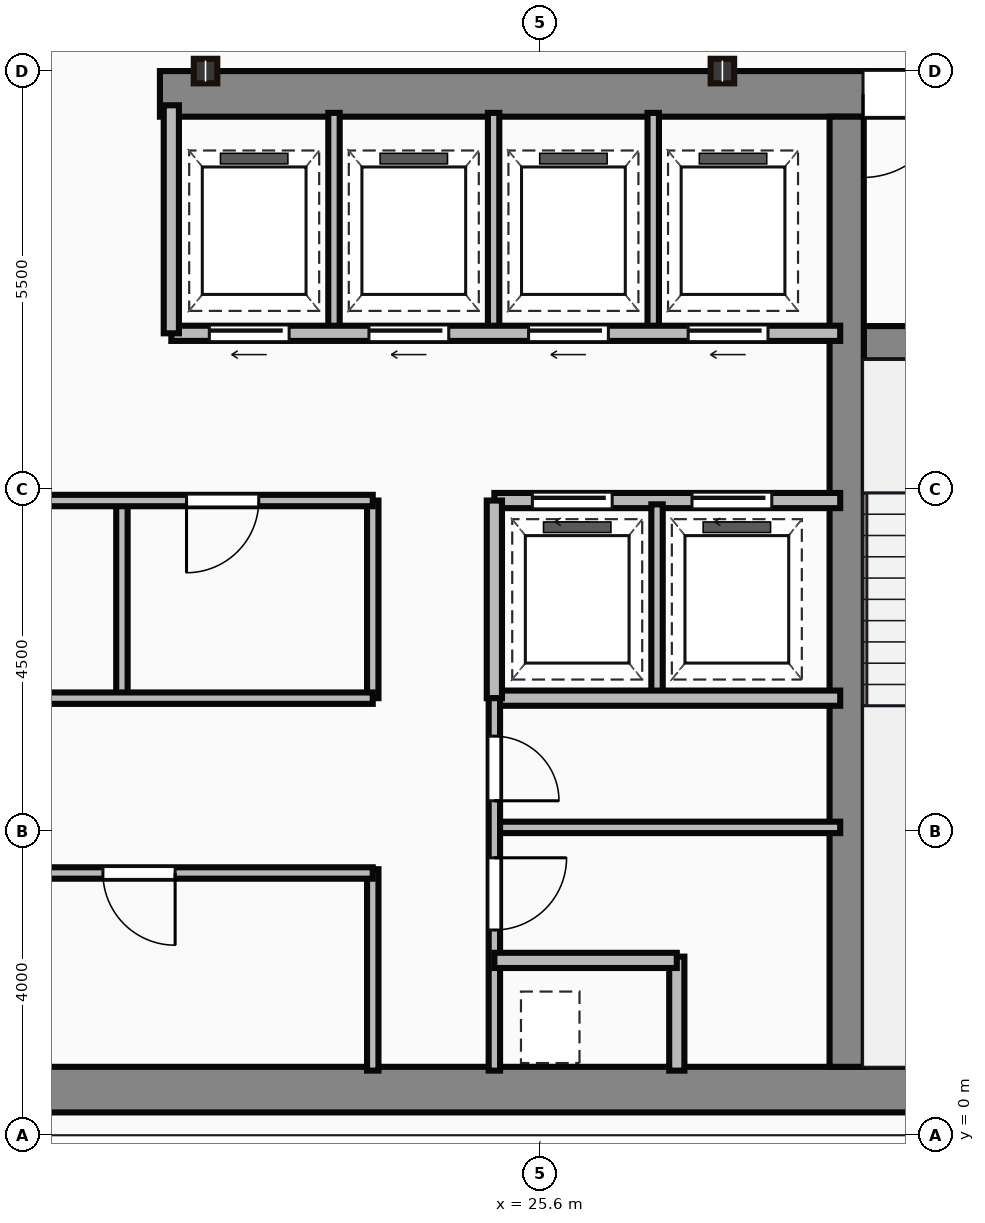
"""IFC4 building model, lengths in metres.
Left out: names, types, materials, properties, quantities, classifications, styles, units other than length and angle.
Written with IfcOpenShell. Run it as: python <this file> out.ifc"""

import sys

from ifc_helpers import new_model, si_unit, direction, frame, frame_2d, origin, origin_2d, place, context, subcontext, project, spatial, rectangle, i_section, extrude, source, transform, mapped, element, fill, save


model = new_model("IFC4")
c1 = context("Model", 3, precision=1e-05, world=origin(), true_north=direction((0.0, 1.0)))
c2 = subcontext(c1, "Body", "Model", "MODEL_VIEW")
j1 = project(units=[si_unit("LENGTHUNIT", "METRE"), si_unit("PLANEANGLEUNIT", "RADIAN")], contexts=[c1])
p1 = place(None, origin())
s1 = spatial("IfcSite", under=j1, at=p1, CompositionType="ELEMENT")
p2 = place(p1, origin())
s2 = spatial("IfcBuilding", under=s1, at=p2, CompositionType="ELEMENT")
p3 = place(p2, frame((0.0, 0.0, 225.1)))
s3 = spatial("IfcBuildingStorey", under=s2, at=p3, CompositionType="ELEMENT", Elevation=225.1)
m1 = source(origin(), c2, "Body", "SweptSolid", [
    extrude(rectangle(XDim=29.5, YDim=0.6, at=frame_2d((14.75, 0.0))), origin(), (0.0, 0.0, 1.0), 3.65),
])
p4 = place(p3, frame((4.5, 0.6, 0.0), z_axis=(0.0, 0.0, 1.0), x_axis=(1.0, 0.0, 0.0)))
e1 = element("IfcWall", 1, at=p4, inside=s3, PredefinedType="SHEAR", context=c2, shape_type="MappedRepresentation", body=[
    mapped(m1, transform((0.0, 0.0, 0.0))),
])
m2 = source(origin(), c2, "Body", "SweptSolid", [
    extrude(rectangle(XDim=12.6, YDim=0.6, at=frame_2d((6.3, 0.0))), origin(), (0.0, 0.0, 1.0), 3.65),
])
p5 = place(p3, frame((20.6, 13.7, 0.0), z_axis=(0.0, 0.0, 1.0), x_axis=(1.0, 0.0, 0.0)))
e2 = element("IfcWall", 2, at=p5, inside=s3, PredefinedType="SHEAR", context=c2, shape_type="MappedRepresentation", body=[
    mapped(m2, transform((0.0, 0.0, 0.0))),
])
p6 = place(p5, frame((9.25, 0.0, 0.0)))
e3 = element("IfcOpeningElement", 3, at=p6, cuts=e2, PredefinedType="OPENING", context=c2, shape_type="SweptSolid", body=[
    extrude(rectangle(XDim=1.1, YDim=2.15, at=frame_2d((0.55, 1.075))), frame((0.0, 0.31, 0.0), z_axis=(0.0, -1.0, 0.0), x_axis=(1.0, 0.0, 0.0)), (0.0, 0.0, 1.0), 0.62),
])
m3 = source(origin(), c2, "Body", "SweptSolid", [
    extrude(rectangle(XDim=12.5, YDim=0.45, at=frame_2d((6.25, 0.0))), origin(), (0.0, 0.0, 1.0), 3.65),
])
p7 = place(p3, frame((29.635, 0.9, 0.0), z_axis=(0.0, 0.0, 1.0), x_axis=(0.0, 1.0, 0.0)))
e4 = element("IfcWall", 4, at=p7, inside=s3, PredefinedType="SHEAR", context=c2, shape_type="MappedRepresentation", body=[
    mapped(m3, transform((0.0, 0.0, 0.0))),
])
m4 = source(origin(), c2, "Body", "SweptSolid", [
    extrude(rectangle(XDim=3.39, YDim=0.45, at=frame_2d((1.695, 0.0))), origin(), (0.0, 0.0, 1.0), 3.65),
])
p8 = place(p3, frame((29.86, 10.42, 0.0), z_axis=(0.0, 0.0, 1.0), x_axis=(1.0, 0.0, 0.0)))
e5 = element("IfcWall", 5, at=p8, inside=s3, PredefinedType="SHEAR", context=c2, shape_type="MappedRepresentation", body=[
    mapped(m4, transform((0.0, 0.0, 0.0))),
])
p9 = place(p8, frame((1.1, 0.0, 0.0)))
e6 = element("IfcOpeningElement", 6, at=p9, cuts=e5, PredefinedType="OPENING", context=c2, shape_type="SweptSolid", body=[
    extrude(rectangle(XDim=1.1, YDim=2.15, at=frame_2d((0.55, 1.075))), frame((0.0, 0.235, 0.0), z_axis=(0.0, -1.0, 0.0), x_axis=(1.0, 0.0, 0.0)), (0.0, 0.0, 1.0), 0.47),
])
m5 = source(origin(), c2, "Body", "SweptSolid", [
    extrude(i_section(OverallWidth=0.309, OverallDepth=0.323, WebThickness=0.014, FlangeThickness=0.023, at=origin_2d()), origin(), (0.0, 0.0, 1.0), 3.65),
])
for number, where, z_axis, x_axis in (
    (7, (21.2, 14.0, 0.0), (0.0, 0.0, 1.0), (1.0, 0.0, 0.0)),
    (8, (28.0, 14.0, 0.0), (0.0, 0.0, 1.0), (1.0, 0.0, 0.0)),
):
    element("IfcColumn", number, at=place(p3, frame(where, z_axis=z_axis, x_axis=x_axis)), inside=s3, PredefinedType="COLUMN", context=c2, shape_type="MappedRepresentation", body=[
        mapped(m5, transform((0.0, 0.0, 0.0))),
    ])
m6 = source(origin(), c2, "Body", "SweptSolid", [
    extrude(rectangle(XDim=10.35, YDim=0.15, at=frame_2d((5.175, 0.0))), origin(), (0.0, 0.0, 1.0), 3.4),
])
p10 = place(p3, frame((13.05, 3.45, 0.0), z_axis=(0.0, 0.0, 1.0), x_axis=(1.0, 0.0, 0.0)))
e9 = element("IfcWall", 9, at=p10, inside=s3, PredefinedType="PARTITIONING", context=c2, shape_type="MappedRepresentation", body=[
    mapped(m6, transform((0.0, 0.0, 0.0))),
])
p11 = place(p10, frame((0.25, 0.0, 0.0)))
e10 = element("IfcOpeningElement", 10, at=p11, cuts=e9, PredefinedType="OPENING", context=c2, shape_type="SweptSolid", body=[
    extrude(rectangle(XDim=0.95, YDim=2.15, at=frame_2d((0.475, 1.075))), frame((0.0, 0.085, 0.0), z_axis=(0.0, -1.0, 0.0), x_axis=(1.0, 0.0, 0.0)), (0.0, 0.0, 1.0), 0.17),
])
p12 = place(p10, frame((6.8, 0.0, 0.0)))
e11 = element("IfcOpeningElement", 11, at=p12, cuts=e9, PredefinedType="OPENING", context=c2, shape_type="SweptSolid", body=[
    extrude(rectangle(XDim=0.95, YDim=2.15, at=frame_2d((0.475, 1.075))), frame((0.0, 0.085, 0.0), z_axis=(0.0, -1.0, 0.0), x_axis=(1.0, 0.0, 0.0)), (0.0, 0.0, 1.0), 0.17),
])
m7 = source(origin(), c2, "Body", "SweptSolid", [
    extrude(rectangle(XDim=2.65, YDim=0.15, at=frame_2d((1.325, 0.0))), origin(), (0.0, 0.0, 1.0), 3.4),
])
p13 = place(p3, frame((23.4, 0.85, 0.0), z_axis=(0.0, 0.0, 1.0), x_axis=(0.0, 1.0, 0.0)))
e12 = element("IfcWall", 12, at=p13, inside=s3, PredefinedType="PARTITIONING", context=c2, shape_type="MappedRepresentation", body=[
    mapped(m7, transform((0.0, 0.0, 0.0))),
])
m8 = source(origin(), c2, "Body", "SweptSolid", [
    extrude(rectangle(XDim=11.85, YDim=0.15, at=frame_2d((5.925, 0.0))), origin(), (0.0, 0.0, 1.0), 3.4),
])
p14 = place(p3, frame((11.55, 5.75, 0.0), z_axis=(0.0, 0.0, 1.0), x_axis=(1.0, 0.0, 0.0)))
e13 = element("IfcWall", 13, at=p14, inside=s3, PredefinedType="PARTITIONING", context=c2, shape_type="MappedRepresentation", body=[
    mapped(m8, transform((0.0, 0.0, 0.0))),
])
p15 = place(p3, frame((11.55, 8.35, 0.0), z_axis=(0.0, 0.0, 1.0), x_axis=(1.0, 0.0, 0.0)))
e14 = element("IfcWall", 14, at=p15, inside=s3, PredefinedType="PARTITIONING", context=c2, shape_type="MappedRepresentation", body=[
    mapped(m8, transform((0.0, 0.0, 0.0))),
])
p16 = place(p15, frame((1.1, 0.0, 0.0)))
e15 = element("IfcOpeningElement", 15, at=p16, cuts=e14, PredefinedType="OPENING", context=c2, shape_type="SweptSolid", body=[
    extrude(rectangle(XDim=0.95, YDim=2.15, at=frame_2d((0.475, 1.075))), frame((0.0, 0.085, 0.0), z_axis=(0.0, -1.0, 0.0), x_axis=(1.0, 0.0, 0.0)), (0.0, 0.0, 1.0), 0.17),
])
p17 = place(p15, frame((9.4, 0.0, 0.0)))
e16 = element("IfcOpeningElement", 16, at=p17, cuts=e14, PredefinedType="OPENING", context=c2, shape_type="SweptSolid", body=[
    extrude(rectangle(XDim=0.95, YDim=2.15, at=frame_2d((0.475, 1.075))), frame((0.0, 0.085, 0.0), z_axis=(0.0, -1.0, 0.0), x_axis=(1.0, 0.0, 0.0)), (0.0, 0.0, 1.0), 0.17),
])
m9 = source(origin(), c2, "Body", "SweptSolid", [
    extrude(rectangle(XDim=2.6, YDim=0.15, at=frame_2d((1.3, 0.0))), origin(), (0.0, 0.0, 1.0), 3.4),
])
p18 = place(p3, frame((23.4, 5.75, 0.0), z_axis=(0.0, 0.0, 1.0), x_axis=(0.0, 1.0, 0.0)))
e17 = element("IfcWall", 17, at=p18, inside=s3, PredefinedType="PARTITIONING", context=c2, shape_type="MappedRepresentation", body=[
    mapped(m9, transform((0.0, 0.0, 0.0))),
])
m10 = source(origin(), c2, "Body", "SweptSolid", [
    extrude(rectangle(XDim=2.5, YDim=0.15, at=frame_2d((1.25, 0.0))), origin(), (0.0, 0.0, 1.0), 3.4),
])
p19 = place(p3, frame((20.1, 5.8, 0.0), z_axis=(0.0, 0.0, 1.0), x_axis=(0.0, 1.0, 0.0)))
e18 = element("IfcWall", 18, at=p19, inside=s3, PredefinedType="PARTITIONING", context=c2, shape_type="MappedRepresentation", body=[
    mapped(m10, transform((0.0, 0.0, 0.0))),
])
m11 = source(origin(), c2, "Body", "SweptSolid", [
    extrude(rectangle(XDim=8.8, YDim=0.2, at=frame_2d((4.4, 0.0))), origin(), (0.0, 0.0, 1.0), 3.4),
])
p20 = place(p3, frame((20.75, 10.55, 0.0), z_axis=(0.0, 0.0, 1.0), x_axis=(1.0, 0.0, 0.0)))
e19 = element("IfcWall", 19, at=p20, inside=s3, PredefinedType="PARTITIONING", context=c2, shape_type="MappedRepresentation", body=[
    mapped(m11, transform((0.0, 0.0, 0.0))),
])
p21 = place(p20, frame((0.5, 0.0, 0.0)))
e20 = element("IfcOpeningElement", 20, at=p21, cuts=e19, PredefinedType="OPENING", context=c2, shape_type="SweptSolid", body=[
    extrude(rectangle(XDim=1.05, YDim=2.15, at=frame_2d((0.525, 1.075))), frame((0.0, 0.11, 0.0), z_axis=(0.0, -1.0, 0.0), x_axis=(1.0, 0.0, 0.0)), (0.0, 0.0, 1.0), 0.22),
])
p22 = place(p20, frame((2.6, 0.0, 0.0)))
e21 = element("IfcOpeningElement", 21, at=p22, cuts=e19, PredefinedType="OPENING", context=c2, shape_type="SweptSolid", body=[
    extrude(rectangle(XDim=1.05, YDim=2.15, at=frame_2d((0.525, 1.075))), frame((0.0, 0.11, 0.0), z_axis=(0.0, -1.0, 0.0), x_axis=(1.0, 0.0, 0.0)), (0.0, 0.0, 1.0), 0.22),
])
p23 = place(p20, frame((4.7, 0.0, 0.0)))
e22 = element("IfcOpeningElement", 22, at=p23, cuts=e19, PredefinedType="OPENING", context=c2, shape_type="SweptSolid", body=[
    extrude(rectangle(XDim=1.05, YDim=2.15, at=frame_2d((0.525, 1.075))), frame((0.0, 0.11, 0.0), z_axis=(0.0, -1.0, 0.0), x_axis=(1.0, 0.0, 0.0)), (0.0, 0.0, 1.0), 0.22),
])
p24 = place(p20, frame((6.8, 0.0, 0.0)))
e23 = element("IfcOpeningElement", 23, at=p24, cuts=e19, PredefinedType="OPENING", context=c2, shape_type="SweptSolid", body=[
    extrude(rectangle(XDim=1.05, YDim=2.15, at=frame_2d((0.525, 1.075))), frame((0.0, 0.11, 0.0), z_axis=(0.0, -1.0, 0.0), x_axis=(1.0, 0.0, 0.0)), (0.0, 0.0, 1.0), 0.22),
])
m12 = source(origin(), c2, "Body", "SweptSolid", [
    extrude(rectangle(XDim=3.0, YDim=0.2, at=frame_2d((1.5, 0.0))), origin(), (0.0, 0.0, 1.0), 3.4),
])
p25 = place(p3, frame((20.75, 10.55, 0.0), z_axis=(0.0, 0.0, 1.0), x_axis=(0.0, 1.0, 0.0)))
e24 = element("IfcWall", 24, at=p25, inside=s3, PredefinedType="PARTITIONING", context=c2, shape_type="MappedRepresentation", body=[
    mapped(m12, transform((0.0, 0.0, 0.0))),
])
m13 = source(origin(), c2, "Body", "SweptSolid", [
    extrude(rectangle(XDim=2.85, YDim=0.15, at=frame_2d((1.425, 0.0))), origin(), (0.0, 0.0, 1.0), 3.4),
])
for number, where, z_axis, x_axis in (
    (25, (22.89, 10.6, 0.0), (0.0, 0.0, 1.0), (0.0, 1.0, 0.0)),
    (26, (24.99, 10.6, 0.0), (0.0, 0.0, 1.0), (0.0, 1.0, 0.0)),
    (27, (27.09, 10.6, 0.0), (0.0, 0.0, 1.0), (0.0, 1.0, 0.0)),
):
    element("IfcWall", number, at=place(p3, frame(where, z_axis=z_axis, x_axis=x_axis)), inside=s3, PredefinedType="PARTITIONING", context=c2, shape_type="MappedRepresentation", body=[
        mapped(m13, transform((0.0, 0.0, 0.0))),
    ])
m14 = source(origin(), c2, "Body", "SweptSolid", [
    extrude(rectangle(XDim=4.55, YDim=0.2, at=frame_2d((2.275, 0.0))), origin(), (0.0, 0.0, 1.0), 3.4),
])
p26 = place(p3, frame((25.0, 8.35, 0.0), z_axis=(0.0, 0.0, 1.0), x_axis=(1.0, 0.0, 0.0)))
e28 = element("IfcWall", 28, at=p26, inside=s3, PredefinedType="PARTITIONING", context=c2, shape_type="MappedRepresentation", body=[
    mapped(m14, transform((0.0, 0.0, 0.0))),
])
p27 = place(p26, frame((0.5, 0.0, 0.0)))
e29 = element("IfcOpeningElement", 29, at=p27, cuts=e28, PredefinedType="OPENING", context=c2, shape_type="SweptSolid", body=[
    extrude(rectangle(XDim=1.05, YDim=2.15, at=frame_2d((0.525, 1.075))), frame((0.0, 0.11, 0.0), z_axis=(0.0, -1.0, 0.0), x_axis=(1.0, 0.0, 0.0)), (0.0, 0.0, 1.0), 0.22),
])
p28 = place(p26, frame((2.6, 0.0, 0.0)))
e30 = element("IfcOpeningElement", 30, at=p28, cuts=e28, PredefinedType="OPENING", context=c2, shape_type="SweptSolid", body=[
    extrude(rectangle(XDim=1.05, YDim=2.15, at=frame_2d((0.525, 1.075))), frame((0.0, 0.11, 0.0), z_axis=(0.0, -1.0, 0.0), x_axis=(1.0, 0.0, 0.0)), (0.0, 0.0, 1.0), 0.22),
])
p29 = place(p3, frame((25.0, 5.75, 0.0), z_axis=(0.0, 0.0, 1.0), x_axis=(1.0, 0.0, 0.0)))
e31 = element("IfcWall", 31, at=p29, inside=s3, PredefinedType="PARTITIONING", context=c2, shape_type="MappedRepresentation", body=[
    mapped(m14, transform((0.0, 0.0, 0.0))),
])
m15 = source(origin(), c2, "Body", "SweptSolid", [
    extrude(rectangle(XDim=2.6, YDim=0.2, at=frame_2d((1.3, 0.0))), origin(), (0.0, 0.0, 1.0), 3.4),
])
p30 = place(p3, frame((25.0, 5.75, 0.0), z_axis=(0.0, 0.0, 1.0), x_axis=(0.0, 1.0, 0.0)))
e32 = element("IfcWall", 32, at=p30, inside=s3, PredefinedType="PARTITIONING", context=c2, shape_type="MappedRepresentation", body=[
    mapped(m15, transform((0.0, 0.0, 0.0))),
])
p31 = place(p3, frame((27.14, 5.8, 0.0), z_axis=(0.0, 0.0, 1.0), x_axis=(0.0, 1.0, 0.0)))
e33 = element("IfcWall", 33, at=p31, inside=s3, PredefinedType="PARTITIONING", context=c2, shape_type="MappedRepresentation", body=[
    mapped(m10, transform((0.0, 0.0, 0.0))),
])
m16 = source(origin(), c2, "Body", "SweptSolid", [
    extrude(rectangle(XDim=4.9, YDim=0.15, at=frame_2d((2.45, 0.0))), origin(), (0.0, 0.0, 1.0), 3.4),
])
p32 = place(p3, frame((25.0, 0.85, 0.0), z_axis=(0.0, 0.0, 1.0), x_axis=(0.0, 1.0, 0.0)))
e34 = element("IfcWall", 34, at=p32, inside=s3, PredefinedType="PARTITIONING", context=c2, shape_type="MappedRepresentation", body=[
    mapped(m16, transform((0.0, 0.0, 0.0))),
])
p33 = place(p32, frame((1.85, 0.0, 0.0)))
e35 = element("IfcOpeningElement", 35, at=p33, cuts=e34, PredefinedType="OPENING", context=c2, shape_type="SweptSolid", body=[
    extrude(rectangle(XDim=0.95, YDim=2.15, at=frame_2d((0.475, 1.075))), frame((0.0, 0.085, 0.0), z_axis=(0.0, -1.0, 0.0), x_axis=(1.0, 0.0, 0.0)), (0.0, 0.0, 1.0), 0.17),
])
p34 = place(p32, frame((3.55, 0.0, 0.0)))
e36 = element("IfcOpeningElement", 36, at=p34, cuts=e34, PredefinedType="OPENING", context=c2, shape_type="SweptSolid", body=[
    extrude(rectangle(XDim=0.85, YDim=2.15, at=frame_2d((0.425, 1.075))), frame((0.0, 0.085, 0.0), z_axis=(0.0, -1.0, 0.0), x_axis=(1.0, 0.0, 0.0)), (0.0, 0.0, 1.0), 0.17),
])
m17 = source(origin(), c2, "Body", "SweptSolid", [
    extrude(rectangle(XDim=2.4, YDim=0.2, at=frame_2d((1.2, 0.0))), origin(), (0.0, 0.0, 1.0), 3.4),
])
p35 = place(p3, frame((25.0, 2.3, 0.0), z_axis=(0.0, 0.0, 1.0), x_axis=(1.0, 0.0, 0.0)))
e37 = element("IfcWall", 37, at=p35, inside=s3, PredefinedType="PARTITIONING", context=c2, shape_type="MappedRepresentation", body=[
    mapped(m17, transform((0.0, 0.0, 0.0))),
])
m18 = source(origin(), c2, "Body", "SweptSolid", [
    extrude(rectangle(XDim=1.5, YDim=0.2, at=frame_2d((0.75, 0.0))), origin(), (0.0, 0.0, 1.0), 3.4),
])
p36 = place(p3, frame((27.4, 0.85, 0.0), z_axis=(0.0, 0.0, 1.0), x_axis=(0.0, 1.0, 0.0)))
e38 = element("IfcWall", 38, at=p36, inside=s3, PredefinedType="PARTITIONING", context=c2, shape_type="MappedRepresentation", body=[
    mapped(m18, transform((0.0, 0.0, 0.0))),
])
m19 = source(origin(), c2, "Body", "SweptSolid", [
    extrude(rectangle(XDim=4.55, YDim=0.15, at=frame_2d((2.275, 0.0))), origin(), (0.0, 0.0, 1.0), 3.4),
])
p37 = place(p3, frame((25.0, 4.05, 0.0), z_axis=(0.0, 0.0, 1.0), x_axis=(1.0, 0.0, 0.0)))
e39 = element("IfcWall", 39, at=p37, inside=s3, PredefinedType="PARTITIONING", context=c2, shape_type="MappedRepresentation", body=[
    mapped(m19, transform((0.0, 0.0, 0.0))),
])
m20 = source(origin(), c2, "Body", "SweptSolid", [
    extrude(rectangle(XDim=1.1, YDim=2.15, at=frame_2d((0.55, 1.075))), frame((0.0, 0.025, 0.0), z_axis=(0.0, -1.0, 0.0), x_axis=(1.0, 0.0, 0.0)), (0.0, 0.0, 1.0), 0.05),
])
p38 = place(p6, origin())
e40 = element("IfcDoor", 40, at=p38, inside=s3, OperationType="SINGLE_SWING_LEFT", PredefinedType="DOOR", context=c2, shape_type="MappedRepresentation", body=[
    mapped(m20, transform((0.0, 0.0, 0.0))),
])
fill(e3, e40)
m21 = source(origin(), c2, "Body", "SweptSolid", [
    extrude(rectangle(XDim=0.95, YDim=2.15, at=frame_2d((0.475, 1.075))), frame((0.0, 0.025, 0.0), z_axis=(0.0, -1.0, 0.0), x_axis=(1.0, 0.0, 0.0)), (0.0, 0.0, 1.0), 0.05),
])
p39 = place(p12, origin())
e41 = element("IfcDoor", 41, at=p39, inside=s3, OperationType="SINGLE_SWING_RIGHT", PredefinedType="DOOR", context=c2, shape_type="MappedRepresentation", body=[
    mapped(m21, transform((0.0, 0.0, 0.0))),
])
fill(e11, e41)
p40 = place(p17, origin())
e42 = element("IfcDoor", 42, at=p40, inside=s3, OperationType="SINGLE_SWING_LEFT", PredefinedType="DOOR", context=c2, shape_type="MappedRepresentation", body=[
    mapped(m21, transform((0.0, 0.0, 0.0))),
])
fill(e16, e42)
m22 = source(origin(), c2, "Body", "SweptSolid", [
    extrude(rectangle(XDim=1.05, YDim=2.15, at=frame_2d((0.525, 1.075))), frame((0.0, 0.025, 0.0), z_axis=(0.0, -1.0, 0.0), x_axis=(1.0, 0.0, 0.0)), (0.0, 0.0, 1.0), 0.05),
])
p41 = place(p21, frame((1.05, 0.0, 0.0), z_axis=(0.0, 0.0, 1.0), x_axis=(-1.0, 0.0, 0.0)))
e43 = element("IfcDoor", 43, at=p41, inside=s3, OperationType="SLIDING_TO_LEFT", PredefinedType="DOOR", context=c2, shape_type="MappedRepresentation", body=[
    mapped(m22, transform((0.0, 0.0, 0.0))),
])
fill(e20, e43)
p42 = place(p22, frame((1.05, 0.0, 0.0), z_axis=(0.0, 0.0, 1.0), x_axis=(-1.0, 0.0, 0.0)))
e44 = element("IfcDoor", 44, at=p42, inside=s3, OperationType="SLIDING_TO_LEFT", PredefinedType="DOOR", context=c2, shape_type="MappedRepresentation", body=[
    mapped(m22, transform((0.0, 0.0, 0.0))),
])
fill(e21, e44)
p43 = place(p23, frame((1.05, 0.0, 0.0), z_axis=(0.0, 0.0, 1.0), x_axis=(-1.0, 0.0, 0.0)))
e45 = element("IfcDoor", 45, at=p43, inside=s3, OperationType="SLIDING_TO_LEFT", PredefinedType="DOOR", context=c2, shape_type="MappedRepresentation", body=[
    mapped(m22, transform((0.0, 0.0, 0.0))),
])
fill(e22, e45)
p44 = place(p24, frame((1.05, 0.0, 0.0), z_axis=(0.0, 0.0, 1.0), x_axis=(-1.0, 0.0, 0.0)))
e46 = element("IfcDoor", 46, at=p44, inside=s3, OperationType="SLIDING_TO_LEFT", PredefinedType="DOOR", context=c2, shape_type="MappedRepresentation", body=[
    mapped(m22, transform((0.0, 0.0, 0.0))),
])
fill(e23, e46)
p45 = place(p27, origin())
e47 = element("IfcDoor", 47, at=p45, inside=s3, OperationType="SLIDING_TO_LEFT", PredefinedType="DOOR", context=c2, shape_type="MappedRepresentation", body=[
    mapped(m22, transform((0.0, 0.0, 0.0))),
])
fill(e29, e47)
p46 = place(p28, origin())
e48 = element("IfcDoor", 48, at=p46, inside=s3, OperationType="SLIDING_TO_LEFT", PredefinedType="DOOR", context=c2, shape_type="MappedRepresentation", body=[
    mapped(m22, transform((0.0, 0.0, 0.0))),
])
fill(e30, e48)
p47 = place(p33, origin())
e49 = element("IfcDoor", 49, at=p47, inside=s3, OperationType="SINGLE_SWING_RIGHT", PredefinedType="DOOR", context=c2, shape_type="MappedRepresentation", body=[
    mapped(m21, transform((0.0, 0.0, 0.0))),
])
fill(e35, e49)
m23 = source(origin(), c2, "Body", "SweptSolid", [
    extrude(rectangle(XDim=0.85, YDim=2.15, at=frame_2d((0.425, 1.075))), frame((0.0, 0.025, 0.0), z_axis=(0.0, -1.0, 0.0), x_axis=(1.0, 0.0, 0.0)), (0.0, 0.0, 1.0), 0.05),
])
p48 = place(p34, origin())
e50 = element("IfcDoor", 50, at=p48, inside=s3, OperationType="SINGLE_SWING_LEFT", PredefinedType="DOOR", context=c2, shape_type="MappedRepresentation", body=[
    mapped(m23, transform((0.0, 0.0, 0.0))),
])
fill(e36, e50)
save(model, sys.argv[1])
